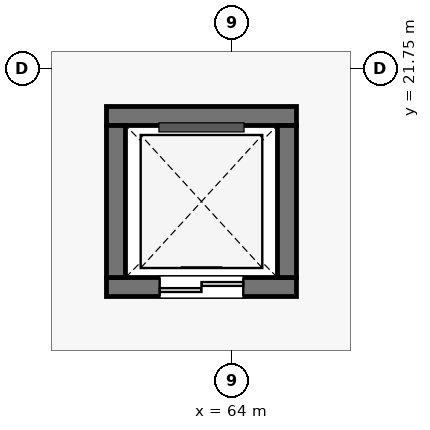
"""IFC4 building model, lengths in metres.
Left out: names, types, materials, properties, quantities, classifications, styles, units other than length and angle.
Written with IfcOpenShell. Run it as: python <this file> out.ifc"""

import sys

from ifc_helpers import new_model, si_unit, direction, frame, frame_2d, origin, place, context, subcontext, project, spatial, rectangle, extrude, element, fill, save


model = new_model("IFC4")
c1 = context("Model", 3, precision=1e-05, world=origin(), true_north=direction((0.0, 1.0)))
c2 = subcontext(c1, "Body", "Model", "MODEL_VIEW")
j1 = project(units=[si_unit("LENGTHUNIT", "METRE"), si_unit("PLANEANGLEUNIT", "RADIAN")], contexts=[c1])
p1 = place(None, origin())
s1 = spatial("IfcSite", under=j1, at=p1, CompositionType="ELEMENT")
p2 = place(p1, origin())
s2 = spatial("IfcBuilding", under=s1, at=p2, CompositionType="ELEMENT")
p3 = place(p2, frame((0.0, 0.0, 8.4)))
s3 = spatial("IfcBuildingStorey", under=s2, at=p3, CompositionType="ELEMENT", Elevation=8.4)
p4 = place(p3, frame((62.35, 21.125, 0.0), z_axis=(0.0, 0.0, 1.0), x_axis=(1.0, 0.0, 0.0)))
e1 = element("IfcWall", 1, at=p4, inside=s3, PredefinedType="SHEAR", context=c2, shape_type="SweptSolid", body=[
    extrude(rectangle(XDim=2.5, YDim=0.25, at=frame_2d((1.25, 0.0))), origin(), (0.0, 0.0, 1.0), 3.25),
])
p5 = place(p3, frame((62.35, 18.875, 0.0), z_axis=(0.0, 0.0, 1.0), x_axis=(1.0, 0.0, 0.0)))
e2 = element("IfcWall", 2, at=p5, inside=s3, PredefinedType="SHEAR", context=c2, shape_type="SweptSolid", body=[
    extrude(rectangle(XDim=2.5, YDim=0.25, at=frame_2d((1.25, 0.0))), origin(), (0.0, 0.0, 1.0), 3.25),
])
p6 = place(p5, frame((0.7, 0.0, 0.0)))
e3 = element("IfcOpeningElement", 3, at=p6, cuts=e2, PredefinedType="OPENING", context=c2, shape_type="SweptSolid", body=[
    extrude(rectangle(XDim=1.1, YDim=2.15, at=frame_2d((0.55, 1.075))), frame((0.0, 0.14, 0.0), z_axis=(0.0, -1.0, 0.0), x_axis=(1.0, 0.0, 0.0)), (0.0, 0.0, 1.0), 0.28),
])
for number, where, z_axis, x_axis in (
    (4, (62.475, 19.0, 0.0), (0.0, 0.0, 1.0), (0.0, 1.0, 0.0)),
    (5, (64.725, 19.0, 0.0), (0.0, 0.0, 1.0), (0.0, 1.0, 0.0)),
):
    element("IfcWall", number, at=place(p3, frame(where, z_axis=z_axis, x_axis=x_axis)), inside=s3, PredefinedType="SHEAR", context=c2, shape_type="SweptSolid", body=[
        extrude(rectangle(XDim=2.0, YDim=0.25, at=frame_2d((1.0, 0.0))), origin(), (0.0, 0.0, 1.0), 3.25),
    ])
p7 = place(p6, origin())
e6 = element("IfcDoor", 6, at=p7, inside=s3, OperationType="DOUBLE_DOOR_SLIDING", PredefinedType="DOOR", context=c2, shape_type="SweptSolid", body=[
    extrude(rectangle(XDim=1.1, YDim=2.15, at=frame_2d((0.55, 1.075))), frame((0.0, 0.025, 0.0), z_axis=(0.0, -1.0, 0.0), x_axis=(1.0, 0.0, 0.0)), (0.0, 0.0, 1.0), 0.05),
])
fill(e3, e6)
save(model, sys.argv[1])
